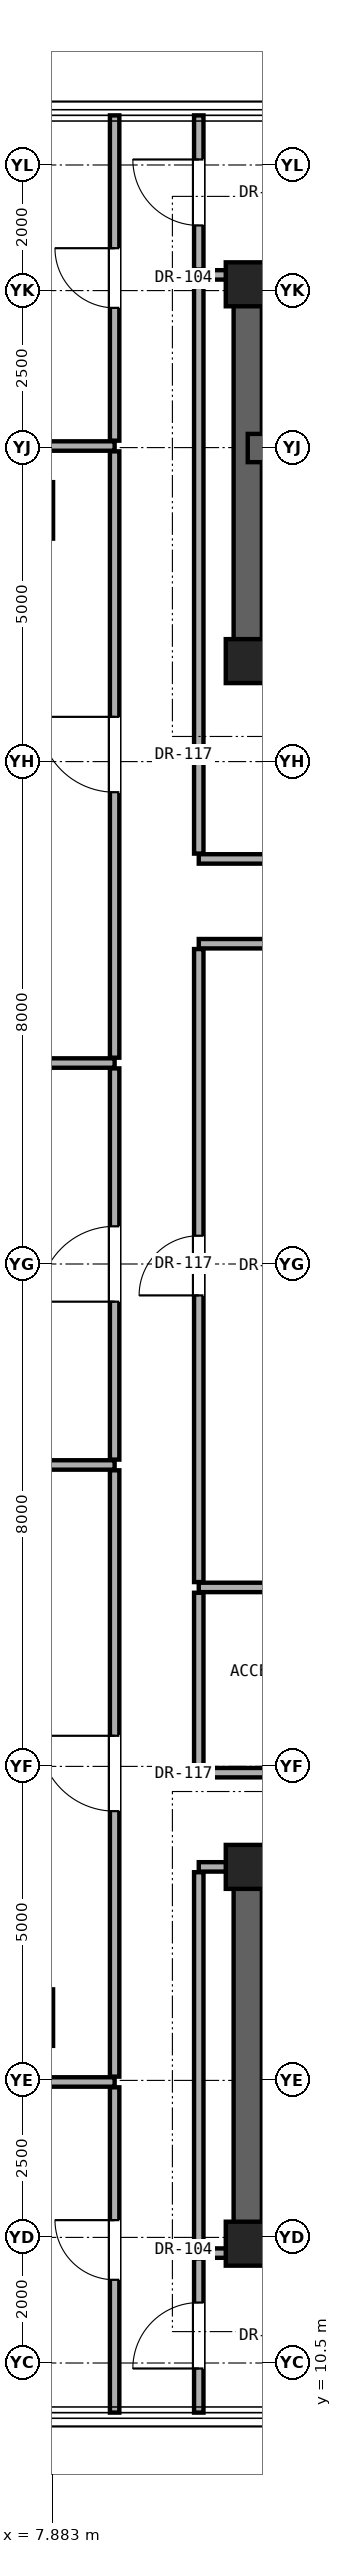
"""IFC4 building model, lengths in metres.
Left out: names, types, materials, properties, quantities, classifications, styles, units other than length and angle.
Written with IfcOpenShell. Run it as: python <this file> out.ifc"""

import sys

from ifc_helpers import new_model, si_unit, direction, frame, frame_2d, origin, origin_2d, place, context, subcontext, project, spatial, rectangle, extrude, element, fill, save


model = new_model("IFC4")
c1 = context("Model", 3, precision=1e-05, world=origin(), true_north=direction((0.0, 1.0)))
c2 = subcontext(c1, "Body", "Model", "MODEL_VIEW")
j1 = project(units=[si_unit("LENGTHUNIT", "METRE"), si_unit("PLANEANGLEUNIT", "RADIAN")], contexts=[c1])
p1 = place(None, origin())
s1 = spatial("IfcSite", under=j1, at=p1, CompositionType="ELEMENT")
p2 = place(p1, origin())
s2 = spatial("IfcBuilding", under=s1, at=p2, CompositionType="ELEMENT")
p3 = place(p2, frame((0.0, 0.0, 249.1)))
s3 = spatial("IfcBuildingStorey", under=s2, at=p3, CompositionType="ELEMENT", Elevation=249.1)
for number, where, z_axis, x_axis in (
    (1, (11.0, 12.4, 0.0), (0.0, 0.0, 1.0), (1.0, 0.0, 0.0)),
    (2, (11.0, 18.4, 0.0), (0.0, 0.0, 1.0), (1.0, 0.0, 0.0)),
    (3, (11.0, 37.6, 0.0), (0.0, 0.0, 1.0), (1.0, 0.0, 0.0)),
    (4, (11.0, 43.6, 0.0), (0.0, 0.0, 1.0), (1.0, 0.0, 0.0)),
):
    element("IfcColumn", number, at=place(p3, frame(where, z_axis=z_axis, x_axis=x_axis)), inside=s3, PredefinedType="COLUMN", context=c2, shape_type="SweptSolid", body=[
        extrude(rectangle(XDim=0.7, YDim=0.7, at=origin_2d()), origin(), (0.0, 0.0, 1.0), 3.6),
    ])
for number, where, z_axis, x_axis in (
    (5, (7.6, 16.0, 0.0), (0.0, 0.0, 1.0), (1.0, 0.0, 0.0)),
    (6, (7.6, 40.0, 0.0), (0.0, 0.0, 1.0), (1.0, 0.0, 0.0)),
):
    element("IfcColumn", number, at=place(p3, frame(where, z_axis=z_axis, x_axis=x_axis)), inside=s3, PredefinedType="PILASTER", context=c2, shape_type="SweptSolid", body=[
        extrude(rectangle(XDim=0.6, YDim=0.9, at=origin_2d()), origin(), (0.0, 0.0, 1.0), 3.6),
    ])
p4 = place(p3, frame((11.0, 43.6, 0.0), z_axis=(0.0, 0.0, 1.0), x_axis=(1.0, 0.0, 0.0)))
e7 = element("IfcWall", 7, at=p4, inside=s3, PredefinedType="SHEAR", context=c2, shape_type="SweptSolid", body=[
    extrude(rectangle(XDim=19.0, YDim=0.45, at=frame_2d((9.5, 0.0))), origin(), (0.0, 0.0, 1.0), 3.4),
])
p5 = place(p3, frame((11.0, 37.6, 0.0), z_axis=(0.0, 0.0, 1.0), x_axis=(0.0, 1.0, 0.0)))
e8 = element("IfcWall", 8, at=p5, inside=s3, PredefinedType="SHEAR", context=c2, shape_type="SweptSolid", body=[
    extrude(rectangle(XDim=6.0, YDim=0.45, at=frame_2d((3.0, 0.0))), origin(), (0.0, 0.0, 1.0), 3.4),
])
p6 = place(p3, frame((11.0, 37.6, 0.0), z_axis=(0.0, 0.0, 1.0), x_axis=(1.0, 0.0, 0.0)))
e9 = element("IfcWall", 9, at=p6, inside=s3, PredefinedType="SHEAR", context=c2, shape_type="SweptSolid", body=[
    extrude(rectangle(XDim=19.0, YDim=0.45, at=frame_2d((9.5, 0.0))), origin(), (0.0, 0.0, 1.0), 3.4),
])
p7 = place(p6, frame((1.06, 0.0, 0.0)))
e10 = element("IfcOpeningElement", 10, at=p7, cuts=e9, PredefinedType="OPENING", context=c2, shape_type="SweptSolid", body=[
    extrude(rectangle(XDim=1.15, YDim=2.2, at=frame_2d((0.575, 1.1))), frame((0.0, 0.235, 0.0), z_axis=(0.0, -1.0, 0.0), x_axis=(1.0, 0.0, 0.0)), (0.0, 0.0, 1.0), 0.47),
])
p8 = place(p6, frame((9.55, 0.0, 0.0)))
e11 = element("IfcOpeningElement", 11, at=p8, cuts=e9, PredefinedType="OPENING", context=c2, shape_type="SweptSolid", body=[
    extrude(rectangle(XDim=1.4, YDim=2.35, at=frame_2d((0.7, 1.175))), frame((0.0, 0.235, 0.0), z_axis=(0.0, -1.0, 0.0), x_axis=(1.0, 0.0, 0.0)), (0.0, 0.0, 1.0), 0.47),
])
p9 = place(p6, frame((11.95, 0.0, 0.0)))
e12 = element("IfcOpeningElement", 12, at=p9, cuts=e9, PredefinedType="OPENING", context=c2, shape_type="SweptSolid", body=[
    extrude(rectangle(XDim=1.4, YDim=2.35, at=frame_2d((0.7, 1.175))), frame((0.0, 0.235, 0.0), z_axis=(0.0, -1.0, 0.0), x_axis=(1.0, 0.0, 0.0)), (0.0, 0.0, 1.0), 0.47),
])
p10 = place(p3, frame((11.0, 40.993, 0.0), z_axis=(0.0, 0.0, 1.0), x_axis=(1.0, 0.0, 0.0)))
e13 = element("IfcWall", 13, at=p10, inside=s3, PredefinedType="SHEAR", context=c2, shape_type="SweptSolid", body=[
    extrude(rectangle(XDim=9.0, YDim=0.45, at=frame_2d((4.5, 0.0))), origin(), (0.0, 0.0, 1.0), 3.4),
])
p11 = place(p3, frame((11.0, 12.4, 0.0), z_axis=(0.0, 0.0, 1.0), x_axis=(1.0, 0.0, 0.0)))
e14 = element("IfcWall", 14, at=p11, inside=s3, PredefinedType="SHEAR", context=c2, shape_type="SweptSolid", body=[
    extrude(rectangle(XDim=19.0, YDim=0.45, at=frame_2d((9.5, 0.0))), origin(), (0.0, 0.0, 1.0), 3.4),
])
p12 = place(p3, frame((11.0, 12.4, 0.0), z_axis=(0.0, 0.0, 1.0), x_axis=(0.0, 1.0, 0.0)))
e15 = element("IfcWall", 15, at=p12, inside=s3, PredefinedType="SHEAR", context=c2, shape_type="SweptSolid", body=[
    extrude(rectangle(XDim=6.0, YDim=0.45, at=frame_2d((3.0, 0.0))), origin(), (0.0, 0.0, 1.0), 3.4),
])
p13 = place(p3, frame((11.0, 18.4, 0.0), z_axis=(0.0, 0.0, 1.0), x_axis=(1.0, 0.0, 0.0)))
e16 = element("IfcWall", 16, at=p13, inside=s3, PredefinedType="SHEAR", context=c2, shape_type="SweptSolid", body=[
    extrude(rectangle(XDim=19.0, YDim=0.45, at=frame_2d((9.5, 0.0))), origin(), (0.0, 0.0, 1.0), 3.4),
])
p14 = place(p13, frame((4.175, 0.0, 0.0)))
e17 = element("IfcOpeningElement", 17, at=p14, cuts=e16, PredefinedType="OPENING", context=c2, shape_type="SweptSolid", body=[
    extrude(rectangle(XDim=1.2, YDim=2.25, at=frame_2d((0.6, 1.125))), frame((0.0, 0.235, 0.0), z_axis=(0.0, -1.0, 0.0), x_axis=(1.0, 0.0, 0.0)), (0.0, 0.0, 1.0), 0.47),
])
p15 = place(p13, frame((11.075, 0.0, 0.0)))
e18 = element("IfcOpeningElement", 18, at=p15, cuts=e16, PredefinedType="OPENING", context=c2, shape_type="SweptSolid", body=[
    extrude(rectangle(XDim=0.95, YDim=2.15, at=frame_2d((0.475, 1.075))), frame((0.0, 0.235, 0.0), z_axis=(0.0, -1.0, 0.0), x_axis=(1.0, 0.0, 0.0)), (0.0, 0.0, 1.0), 0.47),
])
p16 = place(p13, frame((14.3, 0.0, 0.0)))
e19 = element("IfcOpeningElement", 19, at=p16, cuts=e16, PredefinedType="OPENING", context=c2, shape_type="SweptSolid", body=[
    extrude(rectangle(XDim=1.3, YDim=2.3, at=frame_2d((0.65, 1.15))), frame((0.0, 0.235, 0.0), z_axis=(0.0, -1.0, 0.0), x_axis=(1.0, 0.0, 0.0)), (0.0, 0.0, 1.0), 0.47),
])
p17 = place(p13, frame((16.6, 0.0, 0.0)))
e20 = element("IfcOpeningElement", 20, at=p17, cuts=e16, PredefinedType="OPENING", context=c2, shape_type="SweptSolid", body=[
    extrude(rectangle(XDim=1.3, YDim=2.3, at=frame_2d((0.65, 1.15))), frame((0.0, 0.235, 0.0), z_axis=(0.0, -1.0, 0.0), x_axis=(1.0, 0.0, 0.0)), (0.0, 0.0, 1.0), 0.47),
])
p18 = place(p3, frame((10.22, 12.25, 0.0), z_axis=(0.0, 0.0, 1.0), x_axis=(1.0, 0.0, 0.0)))
e21 = element("IfcWall", 21, at=p18, inside=s3, PredefinedType="PARTITIONING", context=c2, shape_type="SweptSolid", body=[
    extrude(rectangle(XDim=0.56, YDim=0.15, at=frame_2d((0.28, 0.0))), origin(), (0.0, 0.0, 1.0), 3.4),
])
p19 = place(p3, frame((5.955, 14.975, 0.0), z_axis=(0.0, 0.0, 1.0), x_axis=(1.0, 0.0, 0.0)))
e22 = element("IfcWall", 22, at=p19, inside=s3, PredefinedType="PARTITIONING", context=c2, shape_type="SweptSolid", body=[
    extrude(rectangle(XDim=2.925, YDim=0.15, at=frame_2d((1.462, 0.0))), origin(), (0.0, 0.0, 1.0), 3.4),
])
p20 = place(p3, frame((10.22, 18.4, 0.0), z_axis=(0.0, 0.0, 1.0), x_axis=(1.0, 0.0, 0.0)))
e23 = element("IfcWall", 23, at=p20, inside=s3, PredefinedType="PARTITIONING", context=c2, shape_type="SweptSolid", body=[
    extrude(rectangle(XDim=0.56, YDim=0.15, at=frame_2d((0.28, 0.0))), origin(), (0.0, 0.0, 1.0), 2.792),
])
p21 = place(p3, frame((10.22, 19.9, 0.0), z_axis=(0.0, 0.0, 1.0), x_axis=(1.0, 0.0, 0.0)))
e24 = element("IfcWall", 24, at=p21, inside=s3, PredefinedType="PARTITIONING", context=c2, shape_type="SweptSolid", body=[
    extrude(rectangle(XDim=20.56, YDim=0.15, at=frame_2d((10.28, 0.0))), origin(), (0.0, 0.0, 1.0), 2.536),
])
p22 = place(p21, frame((1.36, 0.0, 0.0)))
e25 = element("IfcOpeningElement", 25, at=p22, cuts=e24, PredefinedType="OPENING", context=c2, shape_type="SweptSolid", body=[
    extrude(rectangle(XDim=0.9, YDim=2.1, at=frame_2d((0.45, 1.05))), frame((0.0, 0.085, 0.0), z_axis=(0.0, -1.0, 0.0), x_axis=(1.0, 0.0, 0.0)), (0.0, 0.0, 1.0), 0.17),
])
p23 = place(p21, frame((4.015, 0.0, 0.0)))
e26 = element("IfcOpeningElement", 26, at=p23, cuts=e24, PredefinedType="OPENING", context=c2, shape_type="SweptSolid", body=[
    extrude(rectangle(XDim=0.95, YDim=2.15, at=frame_2d((0.475, 1.075))), frame((0.0, 0.085, 0.0), z_axis=(0.0, -1.0, 0.0), x_axis=(1.0, 0.0, 0.0)), (0.0, 0.0, 1.0), 0.17),
])
p24 = place(p21, frame((7.804, 0.0, 0.0)))
e27 = element("IfcOpeningElement", 27, at=p24, cuts=e24, PredefinedType="OPENING", context=c2, shape_type="SweptSolid", body=[
    extrude(rectangle(XDim=1.05, YDim=2.2, at=frame_2d((0.525, 1.1))), frame((0.0, 0.085, 0.0), z_axis=(0.0, -1.0, 0.0), x_axis=(1.0, 0.0, 0.0)), (0.0, 0.0, 1.0), 0.17),
])
p25 = place(p3, frame((10.22, 22.85, 0.0), z_axis=(0.0, 0.0, 1.0), x_axis=(1.0, 0.0, 0.0)))
e28 = element("IfcWall", 28, at=p25, inside=s3, PredefinedType="PARTITIONING", context=c2, shape_type="SweptSolid", body=[
    extrude(rectangle(XDim=6.0, YDim=0.15, at=frame_2d((3.0, 0.0))), origin(), (0.0, 0.0, 1.0), 2.536),
])
for number, where, z_axis, x_axis in (
    (29, (0.67, 24.8, 0.0), (0.0, 0.0, 1.0), (1.0, 0.0, 0.0)),
    (30, (0.67, 31.2, 0.0), (0.0, 0.0, 1.0), (1.0, 0.0, 0.0)),
):
    element("IfcWall", number, at=place(p3, frame(where, z_axis=z_axis, x_axis=x_axis)), inside=s3, PredefinedType="PARTITIONING", context=c2, shape_type="SweptSolid", body=[
        extrude(rectangle(XDim=8.21, YDim=0.15, at=frame_2d((4.105, 0.0))), origin(), (0.0, 0.0, 1.0), 2.619),
    ])
p26 = place(p3, frame((10.22, 33.1, 0.0), z_axis=(0.0, 0.0, 1.0), x_axis=(1.0, 0.0, 0.0)))
e31 = element("IfcWall", 31, at=p26, inside=s3, PredefinedType="PARTITIONING", context=c2, shape_type="SweptSolid", body=[
    extrude(rectangle(XDim=20.56, YDim=0.15, at=frame_2d((10.28, 0.0))), origin(), (0.0, 0.0, 1.0), 2.536),
])
p27 = place(p26, frame((12.682, 0.0, 0.0)))
e32 = element("IfcOpeningElement", 32, at=p27, cuts=e31, PredefinedType="OPENING", context=c2, shape_type="SweptSolid", body=[
    extrude(rectangle(XDim=1.05, YDim=2.2, at=frame_2d((0.525, 1.1))), frame((0.0, 0.085, 0.0), z_axis=(0.0, -1.0, 0.0), x_axis=(1.0, 0.0, 0.0)), (0.0, 0.0, 1.0), 0.17),
])
p28 = place(p26, frame((17.613, 0.0, 0.0)))
e33 = element("IfcOpeningElement", 33, at=p28, cuts=e31, PredefinedType="OPENING", context=c2, shape_type="SweptSolid", body=[
    extrude(rectangle(XDim=1.05, YDim=2.2, at=frame_2d((0.525, 1.1))), frame((0.0, 0.085, 0.0), z_axis=(0.0, -1.0, 0.0), x_axis=(1.0, 0.0, 0.0)), (0.0, 0.0, 1.0), 0.17),
])
p29 = place(p3, frame((10.22, 34.45, 0.0), z_axis=(0.0, 0.0, 1.0), x_axis=(1.0, 0.0, 0.0)))
e34 = element("IfcWall", 34, at=p29, inside=s3, PredefinedType="PARTITIONING", context=c2, shape_type="SweptSolid", body=[
    extrude(rectangle(XDim=1.58, YDim=0.15, at=frame_2d((0.79, 0.0))), origin(), (0.0, 0.0, 1.0), 2.536),
])
p30 = place(p3, frame((5.955, 41.025, 0.0), z_axis=(0.0, 0.0, 1.0), x_axis=(1.0, 0.0, 0.0)))
e35 = element("IfcWall", 35, at=p30, inside=s3, PredefinedType="PARTITIONING", context=c2, shape_type="SweptSolid", body=[
    extrude(rectangle(XDim=2.925, YDim=0.15, at=frame_2d((1.462, 0.0))), origin(), (0.0, 0.0, 1.0), 3.4),
])
p31 = place(p3, frame((10.22, 43.75, 0.0), z_axis=(0.0, 0.0, 1.0), x_axis=(1.0, 0.0, 0.0)))
e36 = element("IfcWall", 36, at=p31, inside=s3, PredefinedType="PARTITIONING", context=c2, shape_type="SweptSolid", body=[
    extrude(rectangle(XDim=0.56, YDim=0.15, at=frame_2d((0.28, 0.0))), origin(), (0.0, 0.0, 1.0), 3.4),
])
p32 = place(p3, frame((8.88, 9.71, 0.0), z_axis=(0.0, 0.0, 1.0), x_axis=(0.0, 1.0, 0.0)))
e37 = element("IfcWall", 37, at=p32, inside=s3, PredefinedType="PARTITIONING", context=c2, shape_type="SweptSolid", body=[
    extrude(rectangle(XDim=5.18, YDim=0.15, at=frame_2d((2.59, 0.0))), origin(), (0.0, 0.0, 1.0), 3.4),
])
p33 = place(p32, frame((2.115, 0.0, 0.0)))
e38 = element("IfcOpeningElement", 38, at=p33, cuts=e37, PredefinedType="OPENING", context=c2, shape_type="SweptSolid", body=[
    extrude(rectangle(XDim=0.95, YDim=2.15, at=frame_2d((0.475, 1.075))), frame((0.0, 0.085, 0.0), z_axis=(0.0, -1.0, 0.0), x_axis=(1.0, 0.0, 0.0)), (0.0, 0.0, 1.0), 0.17),
])
p34 = place(p3, frame((8.88, 15.06, 0.0), z_axis=(0.0, 0.0, 1.0), x_axis=(0.0, 1.0, 0.0)))
e39 = element("IfcWall", 39, at=p34, inside=s3, PredefinedType="PARTITIONING", context=c2, shape_type="SweptSolid", body=[
    extrude(rectangle(XDim=9.655, YDim=0.15, at=frame_2d((4.828, 0.0))), origin(), (0.0, 0.0, 1.0), 2.696),
])
p35 = place(p34, frame((4.228, 0.0, 0.0)))
e40 = element("IfcOpeningElement", 40, at=p35, cuts=e39, PredefinedType="OPENING", context=c2, shape_type="SweptSolid", body=[
    extrude(rectangle(XDim=1.2, YDim=2.25, at=frame_2d((0.6, 1.125))), frame((0.0, 0.085, 0.0), z_axis=(0.0, -1.0, 0.0), x_axis=(1.0, 0.0, 0.0)), (0.0, 0.0, 1.0), 0.17),
])
p36 = place(p3, frame((8.88, 24.885, 0.0), z_axis=(0.0, 0.0, 1.0), x_axis=(0.0, 1.0, 0.0)))
e41 = element("IfcWall", 41, at=p36, inside=s3, PredefinedType="PARTITIONING", context=c2, shape_type="SweptSolid", body=[
    extrude(rectangle(XDim=6.23, YDim=0.15, at=frame_2d((3.115, 0.0))), origin(), (0.0, 0.0, 1.0), 2.696),
])
p37 = place(p36, frame((2.515, 0.0, 0.0)))
e42 = element("IfcOpeningElement", 42, at=p37, cuts=e41, PredefinedType="OPENING", context=c2, shape_type="SweptSolid", body=[
    extrude(rectangle(XDim=1.2, YDim=2.25, at=frame_2d((0.6, 1.125))), frame((0.0, 0.085, 0.0), z_axis=(0.0, -1.0, 0.0), x_axis=(1.0, 0.0, 0.0)), (0.0, 0.0, 1.0), 0.17),
])
p38 = place(p3, frame((8.88, 31.285, 0.0), z_axis=(0.0, 0.0, 1.0), x_axis=(0.0, 1.0, 0.0)))
e43 = element("IfcWall", 43, at=p38, inside=s3, PredefinedType="PARTITIONING", context=c2, shape_type="SweptSolid", body=[
    extrude(rectangle(XDim=9.655, YDim=0.15, at=frame_2d((4.828, 0.0))), origin(), (0.0, 0.0, 1.0), 2.696),
])
p39 = place(p38, frame((4.228, 0.0, 0.0)))
e44 = element("IfcOpeningElement", 44, at=p39, cuts=e43, PredefinedType="OPENING", context=c2, shape_type="SweptSolid", body=[
    extrude(rectangle(XDim=1.2, YDim=2.25, at=frame_2d((0.6, 1.125))), frame((0.0, 0.085, 0.0), z_axis=(0.0, -1.0, 0.0), x_axis=(1.0, 0.0, 0.0)), (0.0, 0.0, 1.0), 0.17),
])
p40 = place(p3, frame((8.88, 41.11, 0.0), z_axis=(0.0, 0.0, 1.0), x_axis=(0.0, 1.0, 0.0)))
e45 = element("IfcWall", 45, at=p40, inside=s3, PredefinedType="PARTITIONING", context=c2, shape_type="SweptSolid", body=[
    extrude(rectangle(XDim=5.18, YDim=0.15, at=frame_2d((2.59, 0.0))), origin(), (0.0, 0.0, 1.0), 3.4),
])
p41 = place(p40, frame((2.115, 0.0, 0.0)))
e46 = element("IfcOpeningElement", 46, at=p41, cuts=e45, PredefinedType="OPENING", context=c2, shape_type="SweptSolid", body=[
    extrude(rectangle(XDim=0.95, YDim=2.15, at=frame_2d((0.475, 1.075))), frame((0.0, 0.085, 0.0), z_axis=(0.0, -1.0, 0.0), x_axis=(1.0, 0.0, 0.0)), (0.0, 0.0, 1.0), 0.17),
])
p42 = place(p3, frame((10.22, 9.71, 0.0), z_axis=(0.0, 0.0, 1.0), x_axis=(0.0, 1.0, 0.0)))
e47 = element("IfcWall", 47, at=p42, inside=s3, PredefinedType="PARTITIONING", context=c2, shape_type="SweptSolid", body=[
    extrude(rectangle(XDim=2.455, YDim=0.15, at=frame_2d((1.228, 0.0))), origin(), (0.0, 0.0, 1.0), 3.4),
])
p43 = place(p42, frame((0.702, 0.0, 0.0)))
e48 = element("IfcOpeningElement", 48, at=p43, cuts=e47, PredefinedType="OPENING", context=c2, shape_type="SweptSolid", body=[
    extrude(rectangle(XDim=1.05, YDim=2.2, at=frame_2d((0.525, 1.1))), frame((0.0, 0.085, 0.0), z_axis=(0.0, -1.0, 0.0), x_axis=(1.0, 0.0, 0.0)), (0.0, 0.0, 1.0), 0.17),
])
p44 = place(p3, frame((10.22, 12.335, 0.0), z_axis=(0.0, 0.0, 1.0), x_axis=(0.0, 1.0, 0.0)))
e49 = element("IfcWall", 49, at=p44, inside=s3, PredefinedType="PARTITIONING", context=c2, shape_type="SweptSolid", body=[
    extrude(rectangle(XDim=5.98, YDim=0.15, at=frame_2d((2.99, 0.0))), origin(), (0.0, 0.0, 1.0), 2.792),
])
p45 = place(p3, frame((10.22, 19.985, 0.0), z_axis=(0.0, 0.0, 1.0), x_axis=(0.0, 1.0, 0.0)))
e50 = element("IfcWall", 50, at=p45, inside=s3, PredefinedType="PARTITIONING", context=c2, shape_type="SweptSolid", body=[
    extrude(rectangle(XDim=2.78, YDim=0.15, at=frame_2d((1.39, 0.0))), origin(), (0.0, 0.0, 1.0), 3.4),
])
p46 = place(p3, frame((10.22, 22.935, 0.0), z_axis=(0.0, 0.0, 1.0), x_axis=(0.0, 1.0, 0.0)))
e51 = element("IfcWall", 51, at=p46, inside=s3, PredefinedType="PARTITIONING", context=c2, shape_type="SweptSolid", body=[
    extrude(rectangle(XDim=10.08, YDim=0.15, at=frame_2d((5.04, 0.0))), origin(), (0.0, 0.0, 1.0), 2.696),
])
p47 = place(p46, frame((4.565, 0.0, 0.0)))
e52 = element("IfcOpeningElement", 52, at=p47, cuts=e51, PredefinedType="OPENING", context=c2, shape_type="SweptSolid", body=[
    extrude(rectangle(XDim=0.95, YDim=2.15, at=frame_2d((0.475, 1.075))), frame((0.0, 0.085, 0.0), z_axis=(0.0, -1.0, 0.0), x_axis=(1.0, 0.0, 0.0)), (0.0, 0.0, 1.0), 0.17),
])
p48 = place(p3, frame((10.22, 34.535, 0.0), z_axis=(0.0, 0.0, 1.0), x_axis=(0.0, 1.0, 0.0)))
e53 = element("IfcWall", 53, at=p48, inside=s3, PredefinedType="PARTITIONING", context=c2, shape_type="SweptSolid", body=[
    extrude(rectangle(XDim=9.13, YDim=0.15, at=frame_2d((4.565, 0.0))), origin(), (0.0, 0.0, 1.0), 2.792),
])
p49 = place(p3, frame((10.22, 43.835, 0.0), z_axis=(0.0, 0.0, 1.0), x_axis=(0.0, 1.0, 0.0)))
e54 = element("IfcWall", 54, at=p49, inside=s3, PredefinedType="PARTITIONING", context=c2, shape_type="SweptSolid", body=[
    extrude(rectangle(XDim=2.455, YDim=0.15, at=frame_2d((1.228, 0.0))), origin(), (0.0, 0.0, 1.0), 3.4),
])
p50 = place(p49, frame((0.702, 0.0, 0.0)))
e55 = element("IfcOpeningElement", 55, at=p50, cuts=e54, PredefinedType="OPENING", context=c2, shape_type="SweptSolid", body=[
    extrude(rectangle(XDim=1.05, YDim=2.2, at=frame_2d((0.525, 1.1))), frame((0.0, 0.085, 0.0), z_axis=(0.0, -1.0, 0.0), x_axis=(1.0, 0.0, 0.0)), (0.0, 0.0, 1.0), 0.17),
])
p51 = place(p35, origin())
e56 = element("IfcDoor", 56, at=p51, inside=s3, OperationType="SINGLE_SWING_RIGHT", PredefinedType="DOOR", context=c2, shape_type="SweptSolid", body=[
    extrude(rectangle(XDim=1.2, YDim=2.25, at=frame_2d((0.6, 1.125))), frame((0.0, 0.025, 0.0), z_axis=(0.0, -1.0, 0.0), x_axis=(1.0, 0.0, 0.0)), (0.0, 0.0, 1.0), 0.05),
])
fill(e40, e56)
p52 = place(p37, origin())
e57 = element("IfcDoor", 57, at=p52, inside=s3, OperationType="SINGLE_SWING_LEFT", PredefinedType="DOOR", context=c2, shape_type="SweptSolid", body=[
    extrude(rectangle(XDim=1.2, YDim=2.25, at=frame_2d((0.6, 1.125))), frame((0.0, 0.025, 0.0), z_axis=(0.0, -1.0, 0.0), x_axis=(1.0, 0.0, 0.0)), (0.0, 0.0, 1.0), 0.05),
])
fill(e42, e57)
p53 = place(p39, origin())
e58 = element("IfcDoor", 58, at=p53, inside=s3, OperationType="SINGLE_SWING_RIGHT", PredefinedType="DOOR", context=c2, shape_type="SweptSolid", body=[
    extrude(rectangle(XDim=1.2, YDim=2.25, at=frame_2d((0.6, 1.125))), frame((0.0, 0.025, 0.0), z_axis=(0.0, -1.0, 0.0), x_axis=(1.0, 0.0, 0.0)), (0.0, 0.0, 1.0), 0.05),
])
fill(e44, e58)
p54 = place(p47, origin())
e59 = element("IfcDoor", 59, at=p54, inside=s3, OperationType="SINGLE_SWING_LEFT", PredefinedType="DOOR", context=c2, shape_type="SweptSolid", body=[
    extrude(rectangle(XDim=0.95, YDim=2.15, at=frame_2d((0.475, 1.075))), frame((0.0, 0.025, 0.0), z_axis=(0.0, -1.0, 0.0), x_axis=(1.0, 0.0, 0.0)), (0.0, 0.0, 1.0), 0.05),
])
fill(e52, e59)
p55 = place(p43, origin())
e60 = element("IfcDoor", 60, at=p55, inside=s3, OperationType="SINGLE_SWING_LEFT", PredefinedType="DOOR", context=c2, shape_type="SweptSolid", body=[
    extrude(rectangle(XDim=1.05, YDim=2.2, at=frame_2d((0.525, 1.1))), frame((0.0, 0.025, 0.0), z_axis=(0.0, -1.0, 0.0), x_axis=(1.0, 0.0, 0.0)), (0.0, 0.0, 1.0), 0.05),
])
fill(e48, e60)
p56 = place(p33, origin())
e61 = element("IfcDoor", 61, at=p56, inside=s3, OperationType="SINGLE_SWING_RIGHT", PredefinedType="DOOR", context=c2, shape_type="SweptSolid", body=[
    extrude(rectangle(XDim=0.95, YDim=2.15, at=frame_2d((0.475, 1.075))), frame((0.0, 0.025, 0.0), z_axis=(0.0, -1.0, 0.0), x_axis=(1.0, 0.0, 0.0)), (0.0, 0.0, 1.0), 0.05),
])
fill(e38, e61)
p57 = place(p50, origin())
e62 = element("IfcDoor", 62, at=p57, inside=s3, OperationType="SINGLE_SWING_RIGHT", PredefinedType="DOOR", context=c2, shape_type="SweptSolid", body=[
    extrude(rectangle(XDim=1.05, YDim=2.2, at=frame_2d((0.525, 1.1))), frame((0.0, 0.025, 0.0), z_axis=(0.0, -1.0, 0.0), x_axis=(1.0, 0.0, 0.0)), (0.0, 0.0, 1.0), 0.05),
])
fill(e55, e62)
p58 = place(p41, origin())
e63 = element("IfcDoor", 63, at=p58, inside=s3, OperationType="SINGLE_SWING_RIGHT", PredefinedType="DOOR", context=c2, shape_type="SweptSolid", body=[
    extrude(rectangle(XDim=0.95, YDim=2.15, at=frame_2d((0.475, 1.075))), frame((0.0, 0.025, 0.0), z_axis=(0.0, -1.0, 0.0), x_axis=(1.0, 0.0, 0.0)), (0.0, 0.0, 1.0), 0.05),
])
fill(e46, e63)
save(model, sys.argv[1])
